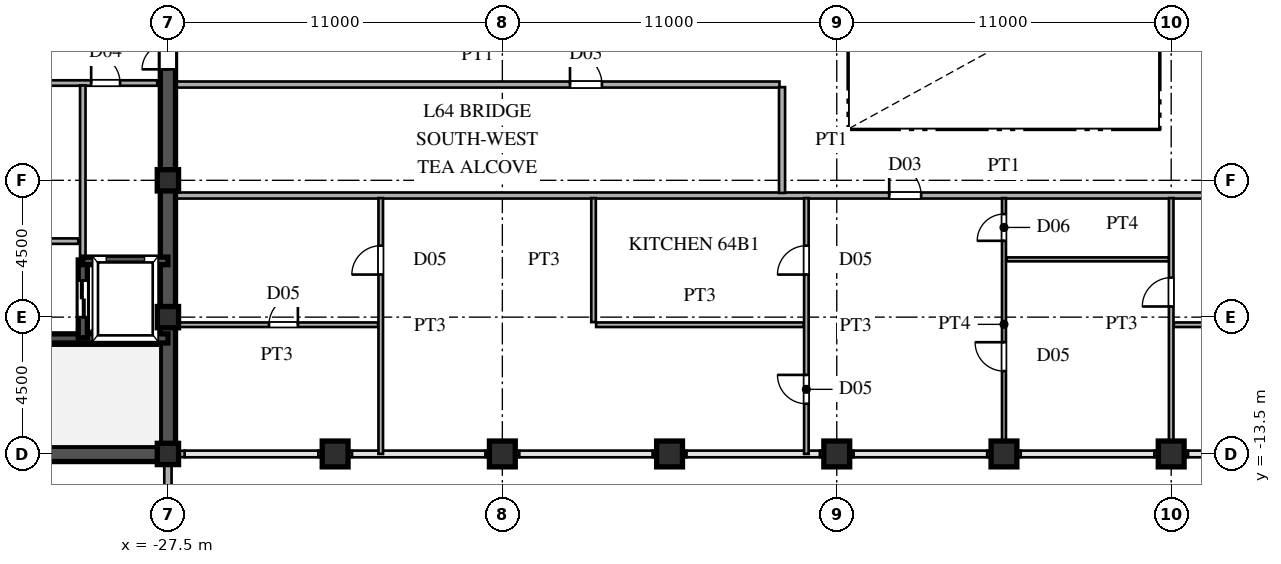
"""IFC4 building model, lengths in metres.
Left out: names, types, materials, properties, quantities, classifications, styles, units other than length and angle.
Written with IfcOpenShell. Run it as: python <this file> out.ifc"""

import sys

from ifc_helpers import new_model, si_unit, direction, frame, frame_2d, origin, origin_2d, place, context, subcontext, project, spatial, rectangle, hollow_rectangle, extrude, source, transform, mapped, element, fill, save


model = new_model("IFC4")
c1 = context("Model", 3, precision=1e-05, world=origin(), true_north=direction((0.0, 1.0)))
c2 = subcontext(c1, "Body", "Model", "MODEL_VIEW")
j1 = project(units=[si_unit("LENGTHUNIT", "METRE"), si_unit("PLANEANGLEUNIT", "RADIAN")], contexts=[c1])
p1 = place(None, origin())
s1 = spatial("IfcSite", under=j1, at=p1, CompositionType="ELEMENT")
p2 = place(p1, origin())
s2 = spatial("IfcBuilding", under=s1, at=p2, CompositionType="ELEMENT")
p3 = place(p2, frame((0.0, 0.0, 243.15)))
s3 = spatial("IfcBuildingStorey", under=s2, at=p3, CompositionType="ELEMENT", Elevation=243.15)
m1 = source(origin(), c2, "Body", "SweptSolid", [
    extrude(hollow_rectangle(XDim=0.7, YDim=0.7, WallThickness=0.03, at=origin_2d()), origin(), (0.0, 0.0, 1.0), 3.75),
])
for number, where, z_axis, x_axis in (
    (1, (-27.5, -13.5, 0.0), (0.0, 0.0, 1.0), (1.0, 0.0, 0.0)),
    (2, (-27.5, -9.0, 0.0), (0.0, 0.0, 1.0), (1.0, 0.0, 0.0)),
    (3, (-27.5, -4.5, 0.0), (0.0, 0.0, 1.0), (1.0, 0.0, 0.0)),
):
    element("IfcColumn", number, at=place(p3, frame(where, z_axis=z_axis, x_axis=x_axis)), inside=s3, PredefinedType="COLUMN", context=c2, shape_type="MappedRepresentation", body=[
        mapped(m1, transform((0.0, 0.0, 0.0), scale=1.0)),
    ])
m2 = source(origin(), c2, "Body", "SweptSolid", [
    extrude(hollow_rectangle(XDim=0.85, YDim=0.85, WallThickness=0.036, at=origin_2d()), origin(), (0.0, 0.0, 1.0), 3.75),
])
for number, where, z_axis, x_axis in (
    (4, (-22.0, -13.5, 0.0), (0.0, 0.0, 1.0), (1.0, 0.0, 0.0)),
    (5, (-16.5, -13.5, 0.0), (0.0, 0.0, 1.0), (1.0, 0.0, 0.0)),
    (6, (-11.0, -13.5, 0.0), (0.0, 0.0, 1.0), (1.0, 0.0, 0.0)),
    (7, (-5.5, -13.5, 0.0), (0.0, 0.0, 1.0), (1.0, 0.0, 0.0)),
    (8, (0.0, -13.5, 0.0), (0.0, 0.0, 1.0), (1.0, 0.0, 0.0)),
    (9, (5.5, -13.5, 0.0), (0.0, 0.0, 1.0), (1.0, 0.0, 0.0)),
):
    element("IfcColumn", number, at=place(p3, frame(where, z_axis=z_axis, x_axis=x_axis)), inside=s3, PredefinedType="COLUMN", context=c2, shape_type="MappedRepresentation", body=[
        mapped(m2, transform((0.0, 0.0, 0.0), scale=1.0)),
    ])
p4 = place(p3, frame((-27.5, -15.98, 0.0), z_axis=(0.0, 0.0, 1.0), x_axis=(0.0, 1.0, 0.0)))
e10 = element("IfcWall", 10, at=p4, inside=s3, PredefinedType="SOLIDWALL", context=c2, shape_type="SweptSolid", body=[
    extrude(rectangle(XDim=1.605, YDim=0.24, at=frame_2d((0.803, 0.0))), origin(), (0.0, 0.0, 1.0), 3.53),
])
p5 = place(p3, frame((-27.5, -14.375, 0.0), z_axis=(0.0, 0.0, 1.0), x_axis=(0.0, 1.0, 0.0)))
e11 = element("IfcWall", 11, at=p5, inside=s3, PredefinedType="SOLIDWALL", context=c2, shape_type="SweptSolid", body=[
    extrude(rectangle(XDim=0.62, YDim=0.24, at=frame_2d((0.31, 0.0))), origin(), (0.0, 0.0, 1.0), 3.03),
])
p6 = place(p3, frame((-27.49, -13.5, 0.0), z_axis=(0.0, 0.0, 1.0), x_axis=(1.0, 0.0, 0.0)))
e12 = element("IfcWall", 12, at=p6, inside=s3, PredefinedType="SOLIDWALL", context=c2, shape_type="SweptSolid", body=[
    extrude(rectangle(XDim=0.54, YDim=0.21, at=frame_2d((0.27, 0.0))), origin(), (0.0, 0.0, 1.0), 3.03),
])
for number, where, z_axis, x_axis in (
    (13, (-22.55, -13.5, 0.0), (0.0, 0.0, 1.0), (1.0, 0.0, 0.0)),
    (14, (-17.05, -13.5, 0.0), (0.0, 0.0, 1.0), (1.0, 0.0, 0.0)),
    (15, (-11.55, -13.5, 0.0), (0.0, 0.0, 1.0), (1.0, 0.0, 0.0)),
    (16, (-6.05, -13.5, 0.0), (0.0, 0.0, 1.0), (1.0, 0.0, 0.0)),
    (17, (-0.55, -13.5, 0.0), (0.0, 0.0, 1.0), (1.0, 0.0, 0.0)),
    (18, (4.95, -13.5, 0.0), (0.0, 0.0, 1.0), (1.0, 0.0, 0.0)),
):
    element("IfcWall", number, at=place(p3, frame(where, z_axis=z_axis, x_axis=x_axis)), inside=s3, PredefinedType="SOLIDWALL", context=c2, shape_type="SweptSolid", body=[
        extrude(rectangle(XDim=1.1, YDim=0.21, at=frame_2d((0.55, 0.0))), origin(), (0.0, 0.0, 1.0), 3.03),
    ])
p7 = place(p3, frame((-27.5, -13.5, 0.0), z_axis=(0.0, 0.0, 1.0), x_axis=(0.0, 1.0, 0.0)))
e19 = element("IfcWall", 19, at=p7, inside=s3, PredefinedType="SHEAR", context=c2, shape_type="SweptSolid", body=[
    extrude(rectangle(XDim=12.2, YDim=0.5, at=frame_2d((6.1, 0.0))), origin(), (0.0, 0.0, 1.0), 3.53),
])
p8 = place(p3, frame((-27.5, -1.3, 0.0), z_axis=(0.0, 0.0, 1.0), x_axis=(0.0, 1.0, 0.0)))
e20 = element("IfcWall", 20, at=p8, inside=s3, PredefinedType="SHEAR", context=c2, shape_type="SweptSolid", body=[
    extrude(rectangle(XDim=2.6, YDim=0.5, at=frame_2d((1.3, 0.0))), origin(), (0.0, 0.0, 1.0), 3.53),
])
p9 = place(p8, frame((0.45, 0.0, 0.0)))
e21 = element("IfcOpeningElement", 21, at=p9, cuts=e20, PredefinedType="OPENING", context=c2, shape_type="SweptSolid", body=[
    extrude(rectangle(XDim=1.7, YDim=2.35, at=frame_2d((0.85, 1.175))), frame((0.0, 0.26, 0.0), z_axis=(0.0, -1.0, 0.0), x_axis=(1.0, 0.0, 0.0)), (0.0, 0.0, 1.0), 0.52),
])
p10 = place(p3, frame((-36.5, -13.5, 0.0), z_axis=(0.0, 0.0, 1.0), x_axis=(1.0, 0.0, 0.0)))
e22 = element("IfcWall", 22, at=p10, inside=s3, PredefinedType="SHEAR", context=c2, shape_type="SweptSolid", body=[
    extrude(rectangle(XDim=9.0, YDim=0.5, at=frame_2d((4.5, 0.0))), origin(), (0.0, 0.0, 1.0), 3.53),
])
p11 = place(p3, frame((-36.5, -9.7, 0.0), z_axis=(0.0, 0.0, 1.0), x_axis=(1.0, 0.0, 0.0)))
e23 = element("IfcWall", 23, at=p11, inside=s3, PredefinedType="SHEAR", context=c2, shape_type="SweptSolid", body=[
    extrude(rectangle(XDim=9.0, YDim=0.3, at=frame_2d((4.5, 0.0))), origin(), (0.0, 0.0, 1.0), 3.53),
])
p12 = place(p11, frame((0.6, 0.0, 0.0)))
e24 = element("IfcOpeningElement", 24, at=p12, cuts=e23, PredefinedType="OPENING", context=c2, shape_type="SweptSolid", body=[
    extrude(rectangle(XDim=1.1, YDim=2.2, at=frame_2d((0.55, 1.1))), frame((0.0, 0.16, 0.0), z_axis=(0.0, -1.0, 0.0), x_axis=(1.0, 0.0, 0.0)), (0.0, 0.0, 1.0), 0.32),
])
p13 = place(p3, frame((-30.3, -7.15, 0.0), z_axis=(0.0, 0.0, 1.0), x_axis=(1.0, 0.0, 0.0)))
e25 = element("IfcWall", 25, at=p13, inside=s3, PredefinedType="SHEAR", context=c2, shape_type="SweptSolid", body=[
    extrude(rectangle(XDim=2.8, YDim=0.25, at=frame_2d((1.4, 0.0))), origin(), (0.0, 0.0, 1.0), 3.53),
])
p14 = place(p3, frame((-30.3, -9.68, 0.0), z_axis=(0.0, 0.0, 1.0), x_axis=(0.0, 1.0, 0.0)))
e26 = element("IfcWall", 26, at=p14, inside=s3, PredefinedType="SHEAR", context=c2, shape_type="SweptSolid", body=[
    extrude(rectangle(XDim=2.56, YDim=0.3, at=frame_2d((1.28, 0.0))), origin(), (0.0, 0.0, 1.0), 3.53),
])
p15 = place(p14, frame((0.68, 0.0, 0.0)))
e27 = element("IfcOpeningElement", 27, at=p15, cuts=e26, PredefinedType="OPENING", context=c2, shape_type="SweptSolid", body=[
    extrude(rectangle(XDim=1.2, YDim=2.25, at=frame_2d((0.6, 1.125))), frame((0.0, 0.16, 0.0), z_axis=(0.0, -1.0, 0.0), x_axis=(1.0, 0.0, 0.0)), (0.0, 0.0, 1.0), 0.32),
])
p16 = place(p3, frame((-36.15, -6.5, 0.0), z_axis=(0.0, 0.0, 1.0), x_axis=(1.0, 0.0, 0.0)))
e28 = element("IfcWall", 28, at=p16, inside=s3, PredefinedType="PARTITIONING", context=c2, shape_type="SweptSolid", body=[
    extrude(rectangle(XDim=5.7, YDim=0.18, at=frame_2d((2.85, 0.0))), origin(), (0.0, 0.0, 1.0), 3.53),
])
p17 = place(p3, frame((-30.3, -1.3, 0.0), z_axis=(0.0, 0.0, 1.0), x_axis=(1.0, 0.0, 0.0)))
e29 = element("IfcWall", 29, at=p17, inside=s3, PredefinedType="PARTITIONING", context=c2, shape_type="SweptSolid", body=[
    extrude(rectangle(XDim=2.45, YDim=0.18, at=frame_2d((1.225, 0.0))), origin(), (0.0, 0.0, 1.0), 3.53),
])
p18 = place(p17, frame((0.275, 0.0, 0.0)))
e30 = element("IfcOpeningElement", 30, at=p18, cuts=e29, PredefinedType="OPENING", context=c2, shape_type="SweptSolid", body=[
    extrude(rectangle(XDim=0.95, YDim=2.15, at=frame_2d((0.475, 1.075))), frame((0.0, 0.1, 0.0), z_axis=(0.0, -1.0, 0.0), x_axis=(1.0, 0.0, 0.0)), (0.0, 0.0, 1.0), 0.2),
])
p19 = place(p3, frame((-33.02, -1.3, 0.0), z_axis=(0.0, 0.0, 1.0), x_axis=(1.0, 0.0, 0.0)))
e31 = element("IfcWall", 31, at=p19, inside=s3, PredefinedType="PARTITIONING", context=c2, shape_type="SweptSolid", body=[
    extrude(rectangle(XDim=2.72, YDim=0.18, at=frame_2d((1.36, 0.0))), origin(), (0.0, 0.0, 1.0), 3.53),
])
p20 = place(p19, frame((0.21, 0.0, 0.0)))
e32 = element("IfcOpeningElement", 32, at=p20, cuts=e31, PredefinedType="OPENING", context=c2, shape_type="SweptSolid", body=[
    extrude(rectangle(XDim=1.15, YDim=2.2, at=frame_2d((0.575, 1.1))), frame((0.0, 0.1, 0.0), z_axis=(0.0, -1.0, 0.0), x_axis=(1.0, 0.0, 0.0)), (0.0, 0.0, 1.0), 0.2),
])
p21 = place(p3, frame((-30.3, -7.12, 0.0), z_axis=(0.0, 0.0, 1.0), x_axis=(0.0, 1.0, 0.0)))
e33 = element("IfcWall", 33, at=p21, inside=s3, PredefinedType="PARTITIONING", context=c2, shape_type="SweptSolid", body=[
    extrude(rectangle(XDim=5.74, YDim=0.18, at=frame_2d((2.87, 0.0))), origin(), (0.0, 0.0, 1.0), 3.53),
])
p22 = place(p3, frame((-27.245, -9.25, 0.0), z_axis=(0.0, 0.0, 1.0), x_axis=(1.0, 0.0, 0.0)))
e34 = element("IfcWall", 34, at=p22, inside=s3, PredefinedType="PARTITIONING", context=c2, shape_type="SweptSolid", body=[
    extrude(rectangle(XDim=6.66, YDim=0.15, at=frame_2d((3.33, 0.0))), origin(), (0.0, 0.0, 1.0), 3.53),
])
p23 = place(p22, frame((3.07, 0.0, 0.0)))
e35 = element("IfcOpeningElement", 35, at=p23, cuts=e34, PredefinedType="OPENING", context=c2, shape_type="SweptSolid", body=[
    extrude(rectangle(XDim=0.95, YDim=2.15, at=frame_2d((0.475, 1.075))), frame((0.0, 0.085, 0.0), z_axis=(0.0, -1.0, 0.0), x_axis=(1.0, 0.0, 0.0)), (0.0, 0.0, 1.0), 0.17),
])
p24 = place(p3, frame((-13.415, -9.25, 0.0), z_axis=(0.0, 0.0, 1.0), x_axis=(1.0, 0.0, 0.0)))
e36 = element("IfcWall", 36, at=p24, inside=s3, PredefinedType="PARTITIONING", context=c2, shape_type="SweptSolid", body=[
    extrude(rectangle(XDim=6.83, YDim=0.15, at=frame_2d((3.415, 0.0))), origin(), (0.0, 0.0, 1.0), 3.53),
])
p25 = place(p3, frame((5.585, -9.25, 0.0), z_axis=(0.0, 0.0, 1.0), x_axis=(1.0, 0.0, 0.0)))
e37 = element("IfcWall", 37, at=p25, inside=s3, PredefinedType="PARTITIONING", context=c2, shape_type="SweptSolid", body=[
    extrude(rectangle(XDim=21.66, YDim=0.15, at=frame_2d((10.83, 0.0))), origin(), (0.0, 0.0, 1.0), 3.53),
])
p26 = place(p25, frame((3.94, 0.0, 0.0)))
e38 = element("IfcOpeningElement", 38, at=p26, cuts=e37, PredefinedType="OPENING", context=c2, shape_type="SweptSolid", body=[
    extrude(rectangle(XDim=0.95, YDim=2.15, at=frame_2d((0.475, 1.075))), frame((0.0, 0.085, 0.0), z_axis=(0.0, -1.0, 0.0), x_axis=(1.0, 0.0, 0.0)), (0.0, 0.0, 1.0), 0.17),
])
p27 = place(p25, frame((11.69, 0.0, 0.0)))
e39 = element("IfcOpeningElement", 39, at=p27, cuts=e37, PredefinedType="OPENING", context=c2, shape_type="SweptSolid", body=[
    extrude(rectangle(XDim=0.95, YDim=2.15, at=frame_2d((0.475, 1.075))), frame((0.0, 0.085, 0.0), z_axis=(0.0, -1.0, 0.0), x_axis=(1.0, 0.0, 0.0)), (0.0, 0.0, 1.0), 0.17),
])
p28 = place(p25, frame((18.19, 0.0, 0.0)))
e40 = element("IfcOpeningElement", 40, at=p28, cuts=e37, PredefinedType="OPENING", context=c2, shape_type="SweptSolid", body=[
    extrude(rectangle(XDim=0.95, YDim=2.15, at=frame_2d((0.475, 1.075))), frame((0.0, 0.085, 0.0), z_axis=(0.0, -1.0, 0.0), x_axis=(1.0, 0.0, 0.0)), (0.0, 0.0, 1.0), 0.17),
])
p29 = place(p3, frame((0.085, -7.1, 0.0), z_axis=(0.0, 0.0, 1.0), x_axis=(1.0, 0.0, 0.0)))
e41 = element("IfcWall", 41, at=p29, inside=s3, PredefinedType="PARTITIONING", context=c2, shape_type="SweptSolid", body=[
    extrude(rectangle(XDim=5.33, YDim=0.13, at=frame_2d((2.665, 0.0))), origin(), (0.0, 0.0, 1.0), 3.53),
])
p30 = place(p3, frame((-27.245, -5.0, 0.0), z_axis=(0.0, 0.0, 1.0), x_axis=(1.0, 0.0, 0.0)))
e42 = element("IfcWall", 42, at=p30, inside=s3, PredefinedType="PARTITIONING", context=c2, shape_type="SweptSolid", body=[
    extrude(rectangle(XDim=54.49, YDim=0.2, at=frame_2d((27.245, 0.0))), origin(), (0.0, 0.0, 1.0), 3.53),
])
p31 = place(p30, frame((23.47, 0.0, 0.0)))
e43 = element("IfcOpeningElement", 43, at=p31, cuts=e42, PredefinedType="OPENING", context=c2, shape_type="SweptSolid", body=[
    extrude(rectangle(XDim=1.05, YDim=2.25, at=frame_2d((0.525, 1.125))), frame((0.0, 0.11, 0.0), z_axis=(0.0, -1.0, 0.0), x_axis=(1.0, 0.0, 0.0)), (0.0, 0.0, 1.0), 0.22),
])
p32 = place(p3, frame((-27.245, -1.35, 0.0), z_axis=(0.0, 0.0, 1.0), x_axis=(1.0, 0.0, 0.0)))
e44 = element("IfcWall", 44, at=p32, inside=s3, PredefinedType="PARTITIONING", context=c2, shape_type="SweptSolid", body=[
    extrude(rectangle(XDim=19.86, YDim=0.2, at=frame_2d((9.93, 0.0))), origin(), (0.0, 0.0, 1.0), 3.53),
])
p33 = place(p32, frame((12.97, 0.0, 0.0)))
e45 = element("IfcOpeningElement", 45, at=p33, cuts=e44, PredefinedType="OPENING", context=c2, shape_type="SweptSolid", body=[
    extrude(rectangle(XDim=1.05, YDim=2.25, at=frame_2d((0.525, 1.125))), frame((0.0, 0.11, 0.0), z_axis=(0.0, -1.0, 0.0), x_axis=(1.0, 0.0, 0.0)), (0.0, 0.0, 1.0), 0.22),
])
p34 = place(p3, frame((-20.5, -13.5, 0.0), z_axis=(0.0, 0.0, 1.0), x_axis=(0.0, 1.0, 0.0)))
e46 = element("IfcWall", 46, at=p34, inside=s3, PredefinedType="PARTITIONING", context=c2, shape_type="SweptSolid", body=[
    extrude(rectangle(XDim=8.415, YDim=0.15, at=frame_2d((4.208, 0.0))), origin(), (0.0, 0.0, 1.0), 3.53),
])
p35 = place(p34, frame((5.9, 0.0, 0.0)))
e47 = element("IfcOpeningElement", 47, at=p35, cuts=e46, PredefinedType="OPENING", context=c2, shape_type="SweptSolid", body=[
    extrude(rectangle(XDim=0.95, YDim=2.15, at=frame_2d((0.475, 1.075))), frame((0.0, 0.085, 0.0), z_axis=(0.0, -1.0, 0.0), x_axis=(1.0, 0.0, 0.0)), (0.0, 0.0, 1.0), 0.17),
])
p36 = place(p3, frame((-13.5, -9.165, 0.0), z_axis=(0.0, 0.0, 1.0), x_axis=(0.0, 1.0, 0.0)))
e48 = element("IfcWall", 48, at=p36, inside=s3, PredefinedType="PARTITIONING", context=c2, shape_type="SweptSolid", body=[
    extrude(rectangle(XDim=4.08, YDim=0.15, at=frame_2d((2.04, 0.0))), origin(), (0.0, 0.0, 1.0), 3.53),
])
p37 = place(p3, frame((-7.3, -4.915, 0.0), z_axis=(0.0, 0.0, 1.0), x_axis=(0.0, 1.0, 0.0)))
e49 = element("IfcWall", 49, at=p37, inside=s3, PredefinedType="PARTITIONING", context=c2, shape_type="SweptSolid", body=[
    extrude(rectangle(XDim=3.48, YDim=0.2, at=frame_2d((1.74, 0.0))), origin(), (0.0, 0.0, 1.0), 3.53),
])
p38 = place(p3, frame((-6.5, -13.5, 0.0), z_axis=(0.0, 0.0, 1.0), x_axis=(0.0, 1.0, 0.0)))
e50 = element("IfcWall", 50, at=p38, inside=s3, PredefinedType="PARTITIONING", context=c2, shape_type="SweptSolid", body=[
    extrude(rectangle(XDim=8.415, YDim=0.15, at=frame_2d((4.208, 0.0))), origin(), (0.0, 0.0, 1.0), 3.53),
])
p39 = place(p38, frame((5.9, 0.0, 0.0)))
e51 = element("IfcOpeningElement", 51, at=p39, cuts=e50, PredefinedType="OPENING", context=c2, shape_type="SweptSolid", body=[
    extrude(rectangle(XDim=0.95, YDim=2.15, at=frame_2d((0.475, 1.075))), frame((0.0, 0.085, 0.0), z_axis=(0.0, -1.0, 0.0), x_axis=(1.0, 0.0, 0.0)), (0.0, 0.0, 1.0), 0.17),
])
p40 = place(p38, frame((1.65, 0.0, 0.0)))
e52 = element("IfcOpeningElement", 52, at=p40, cuts=e50, PredefinedType="OPENING", context=c2, shape_type="SweptSolid", body=[
    extrude(rectangle(XDim=0.95, YDim=2.15, at=frame_2d((0.475, 1.075))), frame((0.0, 0.085, 0.0), z_axis=(0.0, -1.0, 0.0), x_axis=(1.0, 0.0, 0.0)), (0.0, 0.0, 1.0), 0.17),
])
p41 = place(p3, frame((0.0, -13.39, 0.0), z_axis=(0.0, 0.0, 1.0), x_axis=(0.0, 1.0, 0.0)))
e53 = element("IfcWall", 53, at=p41, inside=s3, PredefinedType="PARTITIONING", context=c2, shape_type="SweptSolid", body=[
    extrude(rectangle(XDim=8.305, YDim=0.13, at=frame_2d((4.152, 0.0))), origin(), (0.0, 0.0, 1.0), 2.43),
])
p42 = place(p41, frame((6.9, 0.0, 0.0)))
e54 = element("IfcOpeningElement", 54, at=p42, cuts=e53, PredefinedType="OPENING", context=c2, shape_type="SweptSolid", body=[
    extrude(rectangle(XDim=0.88, YDim=2.1, at=frame_2d((0.44, 1.05))), frame((0.0, 0.075, 0.0), z_axis=(0.0, -1.0, 0.0), x_axis=(1.0, 0.0, 0.0)), (0.0, 0.0, 1.0), 0.15),
])
p43 = place(p41, frame((2.615, 0.0, 0.0)))
e55 = element("IfcOpeningElement", 55, at=p43, cuts=e53, PredefinedType="OPENING", context=c2, shape_type="SweptSolid", body=[
    extrude(rectangle(XDim=0.95, YDim=2.15, at=frame_2d((0.475, 1.075))), frame((0.0, 0.075, 0.0), z_axis=(0.0, -1.0, 0.0), x_axis=(1.0, 0.0, 0.0)), (0.0, 0.0, 1.0), 0.15),
])
p44 = place(p3, frame((5.5, -13.39, 0.0), z_axis=(0.0, 0.0, 1.0), x_axis=(0.0, 1.0, 0.0)))
e56 = element("IfcWall", 56, at=p44, inside=s3, PredefinedType="PARTITIONING", context=c2, shape_type="SweptSolid", body=[
    extrude(rectangle(XDim=8.305, YDim=0.15, at=frame_2d((4.152, 0.0))), origin(), (0.0, 0.0, 1.0), 2.43),
])
p45 = place(p44, frame((4.74, 0.0, 0.0)))
e57 = element("IfcOpeningElement", 57, at=p45, cuts=e56, PredefinedType="OPENING", context=c2, shape_type="SweptSolid", body=[
    extrude(rectangle(XDim=0.95, YDim=2.15, at=frame_2d((0.475, 1.075))), frame((0.0, 0.085, 0.0), z_axis=(0.0, -1.0, 0.0), x_axis=(1.0, 0.0, 0.0)), (0.0, 0.0, 1.0), 0.17),
])
m3 = source(origin(), c2, "Body", "SweptSolid", [
    extrude(rectangle(XDim=1.7, YDim=2.35, at=frame_2d((0.85, 1.175))), frame((0.0, 0.025, 0.0), z_axis=(0.0, -1.0, 0.0), x_axis=(1.0, 0.0, 0.0)), (0.0, 0.0, 1.0), 0.05),
])
p46 = place(p9, origin())
e58 = element("IfcDoor", 58, at=p46, inside=s3, OperationType="DOUBLE_SWING_LEFT", PredefinedType="DOOR", context=c2, shape_type="MappedRepresentation", body=[
    mapped(m3, transform((0.0, 0.0, 0.0), scale=1.0)),
])
fill(e21, e58)
m4 = source(origin(), c2, "Body", "SweptSolid", [
    extrude(rectangle(XDim=1.2, YDim=2.25, at=frame_2d((0.6, 1.125))), frame((0.0, 0.025, 0.0), z_axis=(0.0, -1.0, 0.0), x_axis=(1.0, 0.0, 0.0)), (0.0, 0.0, 1.0), 0.05),
])
p47 = place(p15, origin())
e59 = element("IfcDoor", 59, at=p47, inside=s3, OperationType="DOUBLE_DOOR_SLIDING", PredefinedType="DOOR", context=c2, shape_type="MappedRepresentation", body=[
    mapped(m4, transform((0.0, 0.0, 0.0), scale=1.0)),
])
fill(e27, e59)
m5 = source(origin(), c2, "Body", "SweptSolid", [
    extrude(rectangle(XDim=0.95, YDim=2.15, at=frame_2d((0.475, 1.075))), frame((0.0, 0.025, 0.0), z_axis=(0.0, -1.0, 0.0), x_axis=(1.0, 0.0, 0.0)), (0.0, 0.0, 1.0), 0.05),
])
p48 = place(p18, origin())
e60 = element("IfcDoor", 60, at=p48, inside=s3, OperationType="SINGLE_SWING_LEFT", PredefinedType="DOOR", context=c2, shape_type="MappedRepresentation", body=[
    mapped(m5, transform((0.0, 0.0, 0.0), scale=1.0)),
])
fill(e30, e60)
m6 = source(origin(), c2, "Body", "SweptSolid", [
    extrude(rectangle(XDim=0.95, YDim=2.15, at=frame_2d((0.475, 1.075))), frame((0.0, 0.025, 0.0), z_axis=(0.0, -1.0, 0.0), x_axis=(1.0, 0.0, 0.0)), (0.0, 0.0, 1.0), 0.05),
])
p49 = place(p23, origin())
e61 = element("IfcDoor", 61, at=p49, inside=s3, OperationType="SINGLE_SWING_RIGHT", PredefinedType="DOOR", context=c2, shape_type="MappedRepresentation", body=[
    mapped(m6, transform((0.0, 0.0, 0.0), scale=1.0)),
])
fill(e35, e61)
m7 = source(origin(), c2, "Body", "SweptSolid", [
    extrude(rectangle(XDim=1.05, YDim=2.25, at=frame_2d((0.525, 1.125))), frame((0.0, 0.025, 0.0), z_axis=(0.0, -1.0, 0.0), x_axis=(1.0, 0.0, 0.0)), (0.0, 0.0, 1.0), 0.05),
])
p50 = place(p31, origin())
e62 = element("IfcDoor", 62, at=p50, inside=s3, OperationType="SINGLE_SWING_LEFT", PredefinedType="DOOR", context=c2, shape_type="MappedRepresentation", body=[
    mapped(m7, transform((0.0, 0.0, 0.0), scale=1.0)),
])
fill(e43, e62)
p51 = place(p33, origin())
e63 = element("IfcDoor", 63, at=p51, inside=s3, OperationType="SINGLE_SWING_LEFT", PredefinedType="DOOR", context=c2, shape_type="MappedRepresentation", body=[
    mapped(m7, transform((0.0, 0.0, 0.0), scale=1.0)),
])
fill(e45, e63)
p52 = place(p35, origin())
e64 = element("IfcDoor", 64, at=p52, inside=s3, OperationType="SINGLE_SWING_LEFT", PredefinedType="DOOR", context=c2, shape_type="MappedRepresentation", body=[
    mapped(m6, transform((0.0, 0.0, 0.0), scale=1.0)),
])
fill(e47, e64)
p53 = place(p39, origin())
e65 = element("IfcDoor", 65, at=p53, inside=s3, OperationType="SINGLE_SWING_LEFT", PredefinedType="DOOR", context=c2, shape_type="MappedRepresentation", body=[
    mapped(m6, transform((0.0, 0.0, 0.0), scale=1.0)),
])
fill(e51, e65)
p54 = place(p40, origin())
e66 = element("IfcDoor", 66, at=p54, inside=s3, OperationType="SINGLE_SWING_RIGHT", PredefinedType="DOOR", context=c2, shape_type="MappedRepresentation", body=[
    mapped(m6, transform((0.0, 0.0, 0.0), scale=1.0)),
])
fill(e52, e66)
m8 = source(origin(), c2, "Body", "SweptSolid", [
    extrude(rectangle(XDim=0.88, YDim=2.1, at=frame_2d((0.44, 1.05))), frame((0.0, 0.025, 0.0), z_axis=(0.0, -1.0, 0.0), x_axis=(1.0, 0.0, 0.0)), (0.0, 0.0, 1.0), 0.05),
])
p55 = place(p42, origin())
e67 = element("IfcDoor", 67, at=p55, inside=s3, OperationType="SINGLE_SWING_LEFT", PredefinedType="DOOR", context=c2, shape_type="MappedRepresentation", body=[
    mapped(m8, transform((0.0, 0.0, 0.0), scale=1.0)),
])
fill(e54, e67)
p56 = place(p43, origin())
e68 = element("IfcDoor", 68, at=p56, inside=s3, OperationType="SINGLE_SWING_RIGHT", PredefinedType="DOOR", context=c2, shape_type="MappedRepresentation", body=[
    mapped(m6, transform((0.0, 0.0, 0.0), scale=1.0)),
])
fill(e55, e68)
p57 = place(p45, origin())
e69 = element("IfcDoor", 69, at=p57, inside=s3, OperationType="SINGLE_SWING_LEFT", PredefinedType="DOOR", context=c2, shape_type="MappedRepresentation", body=[
    mapped(m6, transform((0.0, 0.0, 0.0), scale=1.0)),
])
fill(e57, e69)
save(model, sys.argv[1])
